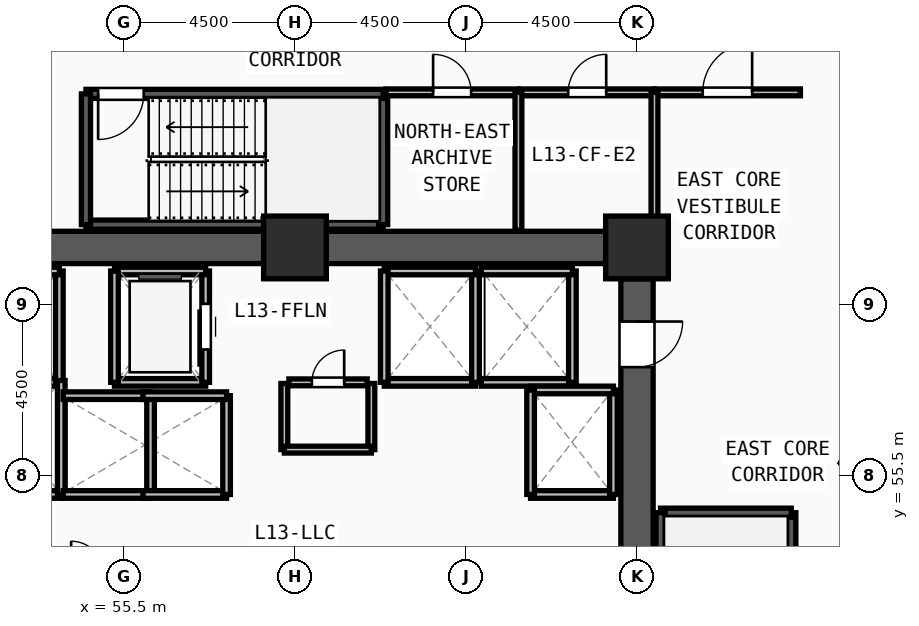
"""IFC4 building model, lengths in metres.
Left out: names, types, materials, properties, quantities, classifications, styles, units other than length and angle.
Written with IfcOpenShell. Run it as: python <this file> out.ifc"""

import sys

from ifc_helpers import new_model, si_unit, direction, frame, frame_2d, origin, origin_2d, place, context, subcontext, project, spatial, rectangle, extrude, source, transform, mapped, element, fill, save


model = new_model("IFC4")
c1 = context("Model", 3, precision=1e-05, world=origin(), true_north=direction((0.0, 1.0)))
c2 = subcontext(c1, "Body", "Model", "MODEL_VIEW")
j1 = project(units=[si_unit("LENGTHUNIT", "METRE"), si_unit("PLANEANGLEUNIT", "RADIAN")], contexts=[c1])
p1 = place(None, origin())
s1 = spatial("IfcSite", under=j1, at=p1, CompositionType="ELEMENT")
p2 = place(p1, origin())
s2 = spatial("IfcBuilding", under=s1, at=p2, CompositionType="ELEMENT")
p3 = place(p2, frame((0.0, 0.0, 51.75)))
s3 = spatial("IfcBuildingStorey", under=s2, at=p3, CompositionType="ELEMENT", Elevation=51.75)
m1 = source(origin(), c2, "Body", "SweptSolid", [
    extrude(rectangle(XDim=1.65, YDim=1.65, at=origin_2d()), origin(), (0.0, 0.0, 1.0), 3.75),
])
for number, where, z_axis, x_axis in (
    (1, (69.0, 61.5, 0.0), (0.0, 0.0, 1.0), (1.0, 0.0, 0.0)),
    (2, (60.0, 61.5, 0.0), (0.0, 0.0, 1.0), (1.0, 0.0, 0.0)),
):
    element("IfcColumn", number, at=place(p3, frame(where, z_axis=z_axis, x_axis=x_axis)), inside=s3, PredefinedType="COLUMN", context=c2, shape_type="MappedRepresentation", body=[
        mapped(m1, transform((0.0, 0.0, 0.0), x_axis=(1.0, 0.0, 0.0), y_axis=(0.0, 1.0, 0.0), z_axis=(0.0, 0.0, 1.0), scale=1.0)),
    ])
for number, where, z_axis, x_axis in (
    (3, (51.825, 61.5, 0.0), (0.0, 0.0, 1.0), (1.0, 0.0, 0.0)),
    (4, (60.825, 61.5, 0.0), (0.0, 0.0, 1.0), (1.0, 0.0, 0.0)),
):
    element("IfcWall", number, at=place(p3, frame(where, z_axis=z_axis, x_axis=x_axis)), inside=s3, PredefinedType="SHEAR", context=c2, shape_type="SweptSolid", body=[
        extrude(rectangle(XDim=7.35, YDim=0.85, at=frame_2d((3.675, 0.0))), origin(), (0.0, 0.0, 1.0), 3.57),
    ])
p4 = place(p3, frame((69.0, 60.675, 0.0), z_axis=(0.0, 0.0, 1.0), x_axis=(0.0, -1.0, 0.0)))
e5 = element("IfcWall", 5, at=p4, inside=s3, PredefinedType="SHEAR", context=c2, shape_type="SweptSolid", body=[
    extrude(rectangle(XDim=13.35, YDim=0.85, at=frame_2d((6.675, 0.0))), origin(), (0.0, 0.0, 1.0), 3.57),
])
m2 = source(origin(), c2, "Body", "SweptSolid", [
    extrude(rectangle(XDim=1.2, YDim=2.2, at=frame_2d((0.6, 1.1))), frame((0.0, 0.435, 0.0), z_axis=(0.0, -1.0, 0.0), x_axis=(1.0, 0.0, 0.0)), (0.0, 0.0, 1.0), 0.87),
])
p5 = place(p4, frame((1.125, 0.0, 0.0)))
e6 = element("IfcOpeningElement", 6, at=p5, cuts=e5, PredefinedType="OPENING", context=c2, shape_type="MappedRepresentation", body=[
    mapped(m2, transform((0.0, 0.0, 0.0), x_axis=(1.0, 0.0, 0.0), y_axis=(0.0, 1.0, 0.0), z_axis=(0.0, 0.0, 1.0), scale=1.0)),
])
p6 = place(p3, frame((73.06, 46.7, 0.0), z_axis=(0.0, 0.0, 1.0), x_axis=(0.0, 1.0, 0.0)))
e7 = element("IfcWall", 7, at=p6, inside=s3, PredefinedType="SOLIDWALL", context=c2, shape_type="SweptSolid", body=[
    extrude(rectangle(XDim=7.82, YDim=0.24, at=frame_2d((3.91, 0.0))), origin(), (0.0, 0.0, 1.0), 3.57),
])
m3 = source(origin(), c2, "Body", "SweptSolid", [
    extrude(rectangle(XDim=1.2, YDim=2.2, at=frame_2d((0.6, 1.1))), frame((0.0, 0.13, 0.0), z_axis=(0.0, -1.0, 0.0), x_axis=(1.0, 0.0, 0.0)), (0.0, 0.0, 1.0), 0.26),
])
p7 = place(p6, frame((0.32, 0.0, 0.0)))
e8 = element("IfcOpeningElement", 8, at=p7, cuts=e7, PredefinedType="OPENING", context=c2, shape_type="MappedRepresentation", body=[
    mapped(m3, transform((0.0, 0.0, 0.0), x_axis=(1.0, 0.0, 0.0), y_axis=(0.0, 1.0, 0.0), z_axis=(0.0, 0.0, 1.0), scale=1.0)),
])
p8 = place(p3, frame((73.06, 54.52, 0.0), z_axis=(0.0, 0.0, 1.0), x_axis=(-1.0, 0.0, 0.0)))
e9 = element("IfcWall", 9, at=p8, inside=s3, PredefinedType="SOLIDWALL", context=c2, shape_type="SweptSolid", body=[
    extrude(rectangle(XDim=3.44, YDim=0.24, at=frame_2d((1.72, 0.0))), origin(), (0.0, 0.0, 1.0), 3.57),
])
for number, where, z_axis, x_axis in (
    (10, (69.62, 54.52, 0.0), (0.0, 0.0, 1.0), (0.0, -1.0, 0.0)),
    (11, (54.5, 62.1, 0.0), (0.0, 0.0, 1.0), (1.0, 0.0, 0.0)),
):
    element("IfcWall", number, at=place(p3, frame(where, z_axis=z_axis, x_axis=x_axis)), inside=s3, PredefinedType="SOLIDWALL", context=c2, shape_type="SweptSolid", body=[
        extrude(rectangle(XDim=7.82, YDim=0.24, at=frame_2d((3.91, 0.0))), origin(), (0.0, 0.0, 1.0), 3.57),
    ])
p9 = place(p3, frame((62.32, 62.1, 0.0), z_axis=(0.0, 0.0, 1.0), x_axis=(0.0, 1.0, 0.0)))
e12 = element("IfcWall", 12, at=p9, inside=s3, PredefinedType="SOLIDWALL", context=c2, shape_type="SweptSolid", body=[
    extrude(rectangle(XDim=3.44, YDim=0.24, at=frame_2d((1.72, 0.0))), origin(), (0.0, 0.0, 1.0), 3.57),
])
p10 = place(p3, frame((62.32, 65.54, 0.0), z_axis=(0.0, 0.0, 1.0), x_axis=(-1.0, 0.0, 0.0)))
e13 = element("IfcWall", 13, at=p10, inside=s3, PredefinedType="SOLIDWALL", context=c2, shape_type="SweptSolid", body=[
    extrude(rectangle(XDim=7.82, YDim=0.24, at=frame_2d((3.91, 0.0))), origin(), (0.0, 0.0, 1.0), 3.57),
])
p11 = place(p10, frame((6.3, 0.0, 0.0)))
e14 = element("IfcOpeningElement", 14, at=p11, cuts=e13, PredefinedType="OPENING", context=c2, shape_type="MappedRepresentation", body=[
    mapped(m3, transform((0.0, 0.0, 0.0), x_axis=(1.0, 0.0, 0.0), y_axis=(0.0, 1.0, 0.0), z_axis=(0.0, 0.0, 1.0), scale=1.0)),
])
p12 = place(p3, frame((54.5, 65.54, 0.0), z_axis=(0.0, 0.0, 1.0), x_axis=(0.0, -1.0, 0.0)))
e15 = element("IfcWall", 15, at=p12, inside=s3, PredefinedType="SOLIDWALL", context=c2, shape_type="SweptSolid", body=[
    extrude(rectangle(XDim=3.44, YDim=0.24, at=frame_2d((1.72, 0.0))), origin(), (0.0, 0.0, 1.0), 3.57),
])
p13 = place(p3, frame((55.25, 57.95, 0.0), z_axis=(0.0, 0.0, 1.0), x_axis=(1.0, 0.0, 0.0)))
e16 = element("IfcWall", 16, at=p13, inside=s3, PredefinedType="SOLIDWALL", context=c2, shape_type="SweptSolid", body=[
    extrude(rectangle(XDim=2.4, YDim=0.2, at=frame_2d((1.2, 0.0))), origin(), (0.0, 0.0, 1.0), 3.57),
])
p14 = place(p3, frame((57.65, 57.95, 0.0), z_axis=(0.0, 0.0, 1.0), x_axis=(0.0, 1.0, 0.0)))
e17 = element("IfcWall", 17, at=p14, inside=s3, PredefinedType="SOLIDWALL", context=c2, shape_type="SweptSolid", body=[
    extrude(rectangle(XDim=2.93, YDim=0.2, at=frame_2d((1.465, 0.0))), origin(), (0.0, 0.0, 1.0), 3.57),
])
m4 = source(origin(), c2, "Body", "SweptSolid", [
    extrude(rectangle(XDim=1.2, YDim=2.3, at=frame_2d((0.6, 1.15))), frame((0.0, 0.11, 0.0), z_axis=(0.0, -1.0, 0.0), x_axis=(1.0, 0.0, 0.0)), (0.0, 0.0, 1.0), 0.22),
])
p15 = place(p14, frame((0.865, 0.0, 0.0)))
e18 = element("IfcOpeningElement", 18, at=p15, cuts=e17, PredefinedType="OPENING", context=c2, shape_type="MappedRepresentation", body=[
    mapped(m4, transform((0.0, 0.0, 0.0), x_axis=(1.0, 0.0, 0.0), y_axis=(0.0, 1.0, 0.0), z_axis=(0.0, 0.0, 1.0), scale=1.0)),
])
p16 = place(p3, frame((57.65, 60.88, 0.0), z_axis=(0.0, 0.0, 1.0), x_axis=(-1.0, 0.0, 0.0)))
e19 = element("IfcWall", 19, at=p16, inside=s3, PredefinedType="SOLIDWALL", context=c2, shape_type="SweptSolid", body=[
    extrude(rectangle(XDim=2.4, YDim=0.2, at=frame_2d((1.2, 0.0))), origin(), (0.0, 0.0, 1.0), 3.57),
])
p17 = place(p3, frame((55.25, 60.88, 0.0), z_axis=(0.0, 0.0, 1.0), x_axis=(0.0, -1.0, 0.0)))
e20 = element("IfcWall", 20, at=p17, inside=s3, PredefinedType="SOLIDWALL", context=c2, shape_type="SweptSolid", body=[
    extrude(rectangle(XDim=2.93, YDim=0.2, at=frame_2d((1.465, 0.0))), origin(), (0.0, 0.0, 1.0), 3.57),
])
p18 = place(p3, frame((62.35, 57.95, 0.0), z_axis=(0.0, 0.0, 1.0), x_axis=(1.0, 0.0, 0.0)))
e21 = element("IfcWall", 21, at=p18, inside=s3, PredefinedType="SOLIDWALL", context=c2, shape_type="SweptSolid", body=[
    extrude(rectangle(XDim=2.4, YDim=0.2, at=frame_2d((1.2, 0.0))), origin(), (0.0, 0.0, 1.0), 3.57),
])
p19 = place(p3, frame((64.75, 57.95, 0.0), z_axis=(0.0, 0.0, 1.0), x_axis=(0.0, 1.0, 0.0)))
e22 = element("IfcWall", 22, at=p19, inside=s3, PredefinedType="SOLIDWALL", context=c2, shape_type="SweptSolid", body=[
    extrude(rectangle(XDim=2.93, YDim=0.2, at=frame_2d((1.465, 0.0))), origin(), (0.0, 0.0, 1.0), 3.57),
])
p20 = place(p3, frame((64.75, 60.88, 0.0), z_axis=(0.0, 0.0, 1.0), x_axis=(-1.0, 0.0, 0.0)))
e23 = element("IfcWall", 23, at=p20, inside=s3, PredefinedType="SOLIDWALL", context=c2, shape_type="SweptSolid", body=[
    extrude(rectangle(XDim=2.4, YDim=0.2, at=frame_2d((1.2, 0.0))), origin(), (0.0, 0.0, 1.0), 3.57),
])
p21 = place(p3, frame((62.35, 60.88, 0.0), z_axis=(0.0, 0.0, 1.0), x_axis=(0.0, -1.0, 0.0)))
e24 = element("IfcWall", 24, at=p21, inside=s3, PredefinedType="SOLIDWALL", context=c2, shape_type="SweptSolid", body=[
    extrude(rectangle(XDim=2.93, YDim=0.2, at=frame_2d((1.465, 0.0))), origin(), (0.0, 0.0, 1.0), 3.57),
])
p22 = place(p3, frame((64.9, 57.95, 0.0), z_axis=(0.0, 0.0, 1.0), x_axis=(1.0, 0.0, 0.0)))
e25 = element("IfcWall", 25, at=p22, inside=s3, PredefinedType="SOLIDWALL", context=c2, shape_type="SweptSolid", body=[
    extrude(rectangle(XDim=2.4, YDim=0.2, at=frame_2d((1.2, 0.0))), origin(), (0.0, 0.0, 1.0), 3.57),
])
p23 = place(p3, frame((67.3, 57.95, 0.0), z_axis=(0.0, 0.0, 1.0), x_axis=(0.0, 1.0, 0.0)))
e26 = element("IfcWall", 26, at=p23, inside=s3, PredefinedType="SOLIDWALL", context=c2, shape_type="SweptSolid", body=[
    extrude(rectangle(XDim=2.93, YDim=0.2, at=frame_2d((1.465, 0.0))), origin(), (0.0, 0.0, 1.0), 3.57),
])
for number, where, z_axis, x_axis in (
    (27, (67.3, 60.88, 0.0), (0.0, 0.0, 1.0), (-1.0, 0.0, 0.0)),
    (28, (51.4, 57.95, 0.0), (0.0, 0.0, 1.0), (1.0, 0.0, 0.0)),
):
    element("IfcWall", number, at=place(p3, frame(where, z_axis=z_axis, x_axis=x_axis)), inside=s3, PredefinedType="SOLIDWALL", context=c2, shape_type="SweptSolid", body=[
        extrude(rectangle(XDim=2.4, YDim=0.2, at=frame_2d((1.2, 0.0))), origin(), (0.0, 0.0, 1.0), 3.57),
    ])
p24 = place(p3, frame((53.8, 57.95, 0.0), z_axis=(0.0, 0.0, 1.0), x_axis=(0.0, 1.0, 0.0)))
e29 = element("IfcWall", 29, at=p24, inside=s3, PredefinedType="SOLIDWALL", context=c2, shape_type="SweptSolid", body=[
    extrude(rectangle(XDim=2.93, YDim=0.2, at=frame_2d((1.465, 0.0))), origin(), (0.0, 0.0, 1.0), 3.57),
])
p25 = place(p3, frame((53.8, 60.88, 0.0), z_axis=(0.0, 0.0, 1.0), x_axis=(-1.0, 0.0, 0.0)))
e30 = element("IfcWall", 30, at=p25, inside=s3, PredefinedType="SOLIDWALL", context=c2, shape_type="SweptSolid", body=[
    extrude(rectangle(XDim=2.4, YDim=0.2, at=frame_2d((1.2, 0.0))), origin(), (0.0, 0.0, 1.0), 3.57),
])
p26 = place(p3, frame((51.62, 55.0, 0.0), z_axis=(0.0, 0.0, 1.0), x_axis=(1.0, 0.0, 0.0)))
e31 = element("IfcWall", 31, at=p26, inside=s3, PredefinedType="SOLIDWALL", context=c2, shape_type="SweptSolid", body=[
    extrude(rectangle(XDim=2.23, YDim=0.2, at=frame_2d((1.115, 0.0))), origin(), (0.0, 0.0, 1.0), 3.57),
])
p27 = place(p3, frame((53.85, 55.0, 0.0), z_axis=(0.0, 0.0, 1.0), x_axis=(0.0, 1.0, 0.0)))
e32 = element("IfcWall", 32, at=p27, inside=s3, PredefinedType="SOLIDWALL", context=c2, shape_type="SweptSolid", body=[
    extrude(rectangle(XDim=3.0, YDim=0.2, at=frame_2d((1.5, 0.0))), origin(), (0.0, 0.0, 1.0), 3.57),
])
p28 = place(p3, frame((66.2, 55.0, 0.0), z_axis=(0.0, 0.0, 1.0), x_axis=(1.0, 0.0, 0.0)))
e33 = element("IfcWall", 33, at=p28, inside=s3, PredefinedType="SOLIDWALL", context=c2, shape_type="SweptSolid", body=[
    extrude(rectangle(XDim=2.18, YDim=0.2, at=frame_2d((1.09, 0.0))), origin(), (0.0, 0.0, 1.0), 3.57),
])
p29 = place(p3, frame((68.38, 55.0, 0.0), z_axis=(0.0, 0.0, 1.0), x_axis=(0.0, 1.0, 0.0)))
e34 = element("IfcWall", 34, at=p29, inside=s3, PredefinedType="SOLIDWALL", context=c2, shape_type="SweptSolid", body=[
    extrude(rectangle(XDim=2.75, YDim=0.2, at=frame_2d((1.375, 0.0))), origin(), (0.0, 0.0, 1.0), 3.57),
])
p30 = place(p3, frame((68.38, 57.75, 0.0), z_axis=(0.0, 0.0, 1.0), x_axis=(-1.0, 0.0, 0.0)))
e35 = element("IfcWall", 35, at=p30, inside=s3, PredefinedType="SOLIDWALL", context=c2, shape_type="SweptSolid", body=[
    extrude(rectangle(XDim=2.18, YDim=0.2, at=frame_2d((1.09, 0.0))), origin(), (0.0, 0.0, 1.0), 3.57),
])
p31 = place(p3, frame((66.2, 57.75, 0.0), z_axis=(0.0, 0.0, 1.0), x_axis=(0.0, -1.0, 0.0)))
e36 = element("IfcWall", 36, at=p31, inside=s3, PredefinedType="SOLIDWALL", context=c2, shape_type="SweptSolid", body=[
    extrude(rectangle(XDim=2.75, YDim=0.2, at=frame_2d((1.375, 0.0))), origin(), (0.0, 0.0, 1.0), 3.57),
])
p32 = place(p3, frame((53.9, 55.0, 0.0), z_axis=(0.0, 0.0, 1.0), x_axis=(1.0, 0.0, 0.0)))
e37 = element("IfcWall", 37, at=p32, inside=s3, PredefinedType="SOLIDWALL", context=c2, shape_type="SweptSolid", body=[
    extrude(rectangle(XDim=2.3, YDim=0.2, at=frame_2d((1.15, 0.0))), origin(), (0.0, 0.0, 1.0), 3.57),
])
p33 = place(p3, frame((56.2, 55.0, 0.0), z_axis=(0.0, 0.0, 1.0), x_axis=(0.0, 1.0, 0.0)))
e38 = element("IfcWall", 38, at=p33, inside=s3, PredefinedType="SOLIDWALL", context=c2, shape_type="SweptSolid", body=[
    extrude(rectangle(XDim=2.6, YDim=0.2, at=frame_2d((1.3, 0.0))), origin(), (0.0, 0.0, 1.0), 3.57),
])
p34 = place(p3, frame((56.2, 57.6, 0.0), z_axis=(0.0, 0.0, 1.0), x_axis=(-1.0, 0.0, 0.0)))
e39 = element("IfcWall", 39, at=p34, inside=s3, PredefinedType="SOLIDWALL", context=c2, shape_type="SweptSolid", body=[
    extrude(rectangle(XDim=2.3, YDim=0.2, at=frame_2d((1.15, 0.0))), origin(), (0.0, 0.0, 1.0), 3.57),
])
p35 = place(p3, frame((56.0, 55.0, 0.0), z_axis=(0.0, 0.0, 1.0), x_axis=(1.0, 0.0, 0.0)))
e40 = element("IfcWall", 40, at=p35, inside=s3, PredefinedType="SOLIDWALL", context=c2, shape_type="SweptSolid", body=[
    extrude(rectangle(XDim=2.2, YDim=0.2, at=frame_2d((1.1, 0.0))), origin(), (0.0, 0.0, 1.0), 3.57),
])
p36 = place(p3, frame((58.2, 55.0, 0.0), z_axis=(0.0, 0.0, 1.0), x_axis=(0.0, 1.0, 0.0)))
e41 = element("IfcWall", 41, at=p36, inside=s3, PredefinedType="SOLIDWALL", context=c2, shape_type="SweptSolid", body=[
    extrude(rectangle(XDim=2.6, YDim=0.2, at=frame_2d((1.3, 0.0))), origin(), (0.0, 0.0, 1.0), 3.57),
])
p37 = place(p3, frame((58.2, 57.6, 0.0), z_axis=(0.0, 0.0, 1.0), x_axis=(-1.0, 0.0, 0.0)))
e42 = element("IfcWall", 42, at=p37, inside=s3, PredefinedType="SOLIDWALL", context=c2, shape_type="SweptSolid", body=[
    extrude(rectangle(XDim=2.2, YDim=0.2, at=frame_2d((1.1, 0.0))), origin(), (0.0, 0.0, 1.0), 3.57),
])
p38 = place(p3, frame((59.84, 57.95, 0.0), z_axis=(0.0, 0.0, 1.0), x_axis=(1.0, 0.0, 0.0)))
e43 = element("IfcWall", 43, at=p38, inside=s3, PredefinedType="PARTITIONING", context=c2, shape_type="SweptSolid", body=[
    extrude(rectangle(XDim=2.06, YDim=0.18, at=frame_2d((1.03, 0.0))), origin(), (0.0, 0.0, 1.0), 3.57),
])
m5 = source(origin(), c2, "Body", "SweptSolid", [
    extrude(rectangle(XDim=0.85, YDim=2.1, at=frame_2d((0.425, 1.05))), frame((0.0, 0.1, 0.0), z_axis=(0.0, -1.0, 0.0), x_axis=(1.0, 0.0, 0.0)), (0.0, 0.0, 1.0), 0.2),
])
p39 = place(p38, frame((0.605, 0.0, 0.0)))
e44 = element("IfcOpeningElement", 44, at=p39, cuts=e43, PredefinedType="OPENING", context=c2, shape_type="MappedRepresentation", body=[
    mapped(m5, transform((0.0, 0.0, 0.0), x_axis=(1.0, 0.0, 0.0), y_axis=(0.0, 1.0, 0.0), z_axis=(0.0, 0.0, 1.0), scale=1.0)),
])
p40 = place(p3, frame((62.39, 65.58, 0.0), z_axis=(0.0, 0.0, 1.0), x_axis=(1.0, 0.0, 0.0)))
e45 = element("IfcWall", 45, at=p40, inside=s3, PredefinedType="PARTITIONING", context=c2, shape_type="SweptSolid", body=[
    extrude(rectangle(XDim=3.49, YDim=0.18, at=frame_2d((1.745, 0.0))), origin(), (0.0, 0.0, 1.0), 3.57),
])
m6 = source(origin(), c2, "Body", "SweptSolid", [
    extrude(rectangle(XDim=1.0, YDim=2.2, at=frame_2d((0.5, 1.1))), frame((0.0, 0.1, 0.0), z_axis=(0.0, -1.0, 0.0), x_axis=(1.0, 0.0, 0.0)), (0.0, 0.0, 1.0), 0.2),
])
p41 = place(p40, frame((1.245, 0.0, 0.0)))
e46 = element("IfcOpeningElement", 46, at=p41, cuts=e45, PredefinedType="OPENING", context=c2, shape_type="MappedRepresentation", body=[
    mapped(m6, transform((0.0, 0.0, 0.0), x_axis=(1.0, 0.0, 0.0), y_axis=(0.0, 1.0, 0.0), z_axis=(0.0, 0.0, 1.0), scale=1.0)),
])
p42 = place(p3, frame((65.92, 65.58, 0.0), z_axis=(0.0, 0.0, 1.0), x_axis=(1.0, 0.0, 0.0)))
e47 = element("IfcWall", 47, at=p42, inside=s3, PredefinedType="PARTITIONING", context=c2, shape_type="SweptSolid", body=[
    extrude(rectangle(XDim=3.54, YDim=0.18, at=frame_2d((1.77, 0.0))), origin(), (0.0, 0.0, 1.0), 3.57),
])
p43 = place(p42, frame((1.27, 0.0, 0.0)))
e48 = element("IfcOpeningElement", 48, at=p43, cuts=e47, PredefinedType="OPENING", context=c2, shape_type="MappedRepresentation", body=[
    mapped(m6, transform((0.0, 0.0, 0.0), x_axis=(1.0, 0.0, 0.0), y_axis=(0.0, 1.0, 0.0), z_axis=(0.0, 0.0, 1.0), scale=1.0)),
])
p44 = place(p3, frame((69.46, 65.58, 0.0), z_axis=(0.0, 0.0, 1.0), x_axis=(1.0, 0.0, 0.0)))
e49 = element("IfcWall", 49, at=p44, inside=s3, PredefinedType="PARTITIONING", context=c2, shape_type="SweptSolid", body=[
    extrude(rectangle(XDim=3.84, YDim=0.18, at=frame_2d((1.92, 0.0))), origin(), (0.0, 0.0, 1.0), 3.57),
])
m7 = source(origin(), c2, "Body", "SweptSolid", [
    extrude(rectangle(XDim=1.3, YDim=2.2, at=frame_2d((0.65, 1.1))), frame((0.0, 0.1, 0.0), z_axis=(0.0, -1.0, 0.0), x_axis=(1.0, 0.0, 0.0)), (0.0, 0.0, 1.0), 0.2),
])
p45 = place(p44, frame((1.27, 0.0, 0.0)))
e50 = element("IfcOpeningElement", 50, at=p45, cuts=e49, PredefinedType="OPENING", context=c2, shape_type="MappedRepresentation", body=[
    mapped(m7, transform((0.0, 0.0, 0.0), x_axis=(1.0, 0.0, 0.0), y_axis=(0.0, 1.0, 0.0), z_axis=(0.0, 0.0, 1.0), scale=1.0)),
])
for number, where, z_axis, x_axis in (
    (51, (59.72, 56.18, 0.0), (0.0, 0.0, 1.0), (0.0, 1.0, 0.0)),
    (52, (62.01, 56.18, 0.0), (0.0, 0.0, 1.0), (0.0, 1.0, 0.0)),
):
    element("IfcWall", number, at=place(p3, frame(where, z_axis=z_axis, x_axis=x_axis)), inside=s3, PredefinedType="PARTITIONING", context=c2, shape_type="SweptSolid", body=[
        extrude(rectangle(XDim=1.74, YDim=0.18, at=frame_2d((0.87, 0.0))), origin(), (0.0, 0.0, 1.0), 3.57),
    ])
p46 = place(p3, frame((59.72, 56.18, 0.0), z_axis=(0.0, 0.0, 1.0), x_axis=(1.0, 0.0, 0.0)))
e53 = element("IfcWall", 53, at=p46, inside=s3, PredefinedType="PARTITIONING", context=c2, shape_type="SweptSolid", body=[
    extrude(rectangle(XDim=2.29, YDim=0.18, at=frame_2d((1.145, 0.0))), origin(), (0.0, 0.0, 1.0), 3.57),
])
for number, where, z_axis, x_axis in (
    (54, (65.88, 61.95, 0.0), (0.0, 0.0, 1.0), (0.0, 1.0, 0.0)),
    (55, (69.46, 61.95, 0.0), (0.0, 0.0, 1.0), (0.0, 1.0, 0.0)),
):
    element("IfcWall", number, at=place(p3, frame(where, z_axis=z_axis, x_axis=x_axis)), inside=s3, PredefinedType="PARTITIONING", context=c2, shape_type="SweptSolid", body=[
        extrude(rectangle(XDim=3.63, YDim=0.18, at=frame_2d((1.815, 0.0))), origin(), (0.0, 0.0, 1.0), 3.57),
    ])
m8 = source(origin(), c2, "Body", "SweptSolid", [
    extrude(rectangle(XDim=1.2, YDim=2.2, at=frame_2d((0.6, 1.1))), frame((0.0, 0.025, 0.0), z_axis=(0.0, -1.0, 0.0), x_axis=(1.0, 0.0, 0.0)), (0.0, 0.0, 1.0), 0.05),
])
p47 = place(p5, origin())
e56 = element("IfcDoor", 56, at=p47, inside=s3, OperationType="SINGLE_SWING_LEFT", PredefinedType="DOOR", context=c2, shape_type="MappedRepresentation", body=[
    mapped(m8, transform((0.0, 0.0, 0.0), x_axis=(1.0, 0.0, 0.0), y_axis=(0.0, 1.0, 0.0), z_axis=(0.0, 0.0, 1.0), scale=1.0)),
])
fill(e6, e56)
p48 = place(p11, origin())
e57 = element("IfcDoor", 57, at=p48, inside=s3, OperationType="SINGLE_SWING_RIGHT", PredefinedType="DOOR", context=c2, shape_type="MappedRepresentation", body=[
    mapped(m8, transform((0.0, 0.0, 0.0), x_axis=(1.0, 0.0, 0.0), y_axis=(0.0, 1.0, 0.0), z_axis=(0.0, 0.0, 1.0), scale=1.0)),
])
fill(e14, e57)
m9 = source(origin(), c2, "Body", "SweptSolid", [
    extrude(rectangle(XDim=1.2, YDim=2.3, at=frame_2d((0.6, 1.15))), frame((0.0, 0.025, 0.0), z_axis=(0.0, -1.0, 0.0), x_axis=(1.0, 0.0, 0.0)), (0.0, 0.0, 1.0), 0.05),
])
p49 = place(p15, origin())
e58 = element("IfcDoor", 58, at=p49, inside=s3, OperationType="SLIDING_TO_LEFT", PredefinedType="DOOR", context=c2, shape_type="MappedRepresentation", body=[
    mapped(m9, transform((0.0, 0.0, 0.0), x_axis=(1.0, 0.0, 0.0), y_axis=(0.0, 1.0, 0.0), z_axis=(0.0, 0.0, 1.0), scale=1.0)),
])
fill(e18, e58)
m10 = source(origin(), c2, "Body", "SweptSolid", [
    extrude(rectangle(XDim=0.85, YDim=2.1, at=frame_2d((0.425, 1.05))), frame((0.0, 0.025, 0.0), z_axis=(0.0, -1.0, 0.0), x_axis=(1.0, 0.0, 0.0)), (0.0, 0.0, 1.0), 0.05),
])
p50 = place(p39, origin())
e59 = element("IfcDoor", 59, at=p50, inside=s3, OperationType="SINGLE_SWING_RIGHT", PredefinedType="DOOR", context=c2, shape_type="MappedRepresentation", body=[
    mapped(m10, transform((0.0, 0.0, 0.0), x_axis=(1.0, 0.0, 0.0), y_axis=(0.0, 1.0, 0.0), z_axis=(0.0, 0.0, 1.0), scale=1.0)),
])
fill(e44, e59)
m11 = source(origin(), c2, "Body", "SweptSolid", [
    extrude(rectangle(XDim=1.0, YDim=2.2, at=frame_2d((0.5, 1.1))), frame((0.0, 0.025, 0.0), z_axis=(0.0, -1.0, 0.0), x_axis=(1.0, 0.0, 0.0)), (0.0, 0.0, 1.0), 0.05),
])
p51 = place(p41, origin())
e60 = element("IfcDoor", 60, at=p51, inside=s3, OperationType="SINGLE_SWING_LEFT", PredefinedType="DOOR", context=c2, shape_type="MappedRepresentation", body=[
    mapped(m11, transform((0.0, 0.0, 0.0), x_axis=(1.0, 0.0, 0.0), y_axis=(0.0, 1.0, 0.0), z_axis=(0.0, 0.0, 1.0), scale=1.0)),
])
fill(e46, e60)
p52 = place(p43, origin())
e61 = element("IfcDoor", 61, at=p52, inside=s3, OperationType="SINGLE_SWING_RIGHT", PredefinedType="DOOR", context=c2, shape_type="MappedRepresentation", body=[
    mapped(m11, transform((0.0, 0.0, 0.0), x_axis=(1.0, 0.0, 0.0), y_axis=(0.0, 1.0, 0.0), z_axis=(0.0, 0.0, 1.0), scale=1.0)),
])
fill(e48, e61)
m12 = source(origin(), c2, "Body", "SweptSolid", [
    extrude(rectangle(XDim=1.3, YDim=2.2, at=frame_2d((0.65, 1.1))), frame((0.0, 0.025, 0.0), z_axis=(0.0, -1.0, 0.0), x_axis=(1.0, 0.0, 0.0)), (0.0, 0.0, 1.0), 0.05),
])
p53 = place(p45, origin())
e62 = element("IfcDoor", 62, at=p53, inside=s3, OperationType="SINGLE_SWING_RIGHT", PredefinedType="DOOR", context=c2, shape_type="MappedRepresentation", body=[
    mapped(m12, transform((0.0, 0.0, 0.0), x_axis=(1.0, 0.0, 0.0), y_axis=(0.0, 1.0, 0.0), z_axis=(0.0, 0.0, 1.0), scale=1.0)),
])
fill(e50, e62)
save(model, sys.argv[1])
